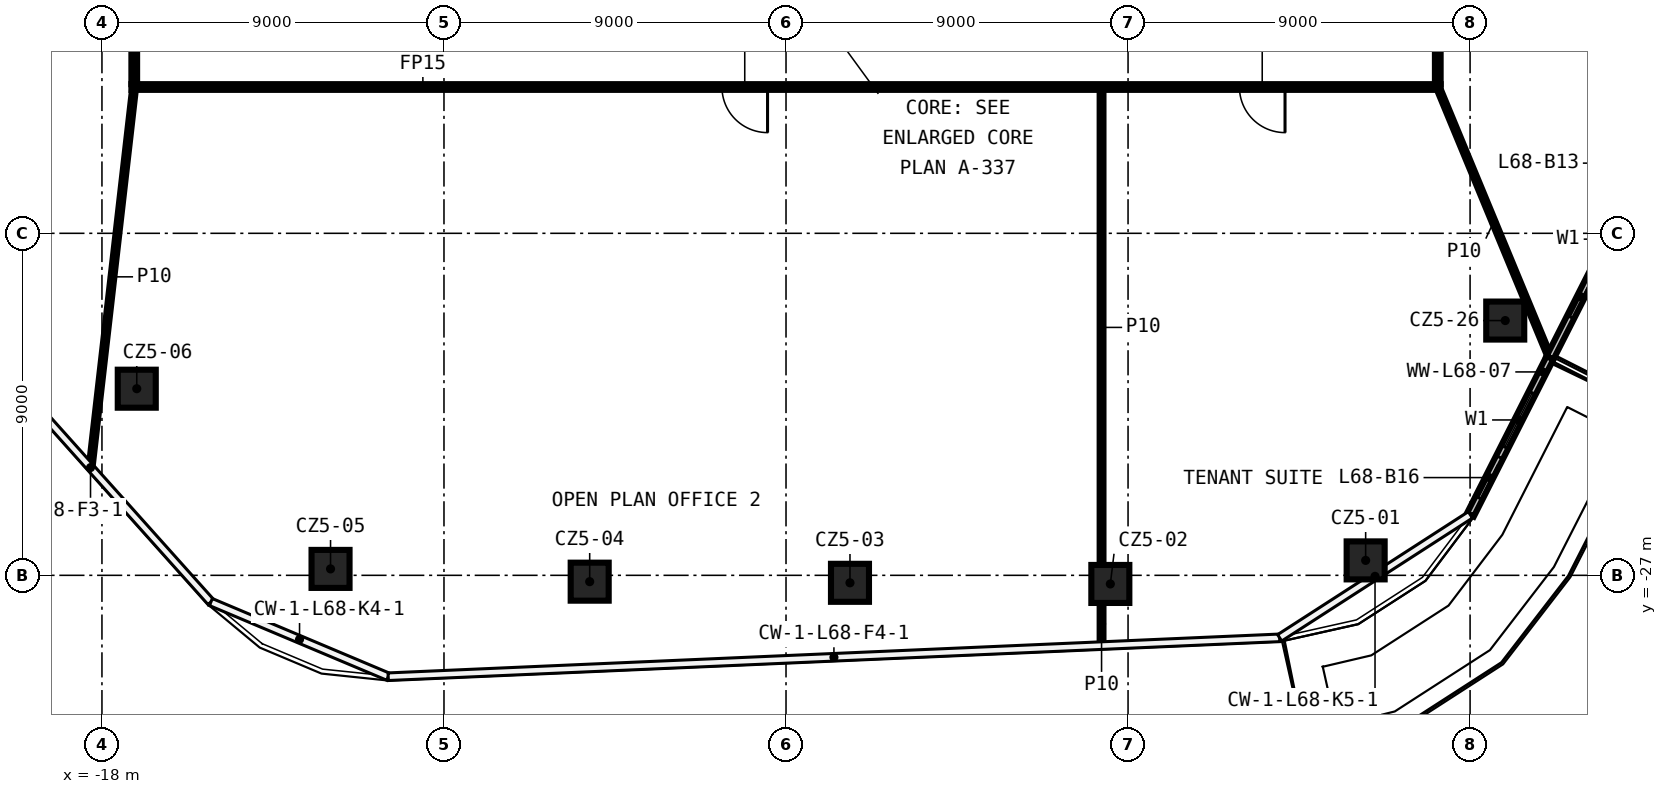
"""IFC4 building model, lengths in metres.
Left out: names, types, materials, properties, quantities, classifications, styles, units other than length and angle.
Written with IfcOpenShell. Run it as: python <this file> out.ifc"""

import sys

from ifc_helpers import new_model, si_unit, direction, frame, frame_2d, origin, origin_2d, place, context, subcontext, project, spatial, rectangle, extrude, element, fill, save


model = new_model("IFC4")
c1 = context("Model", 3, precision=1e-05, world=origin(), true_north=direction((0.0, 1.0)))
c2 = subcontext(c1, "Body", "Model", "MODEL_VIEW")
j1 = project(units=[si_unit("LENGTHUNIT", "METRE"), si_unit("PLANEANGLEUNIT", "RADIAN")], contexts=[c1])
p1 = place(None, origin())
s1 = spatial("IfcSite", under=j1, at=p1, CompositionType="ELEMENT")
p2 = place(p1, origin())
s2 = spatial("IfcBuilding", under=s1, at=p2, CompositionType="ELEMENT")
p3 = place(p2, frame((0.0, 0.0, 319.4)))
s3 = spatial("IfcBuildingStorey", under=s2, at=p3, CompositionType="ELEMENT", Elevation=319.4)
for number, where, z_axis, x_axis in (
    (1, (15.252, -26.607, 0.0), (0.0, 0.0, 1.0), (1.0, 0.0, 0.0)),
    (2, (8.534, -27.227, 0.0), (0.0, 0.0, 1.0), (1.0, 0.0, 0.0)),
    (3, (1.683, -27.197, 0.0), (0.0, 0.0, 1.0), (1.0, 0.0, 0.0)),
    (4, (-5.166, -27.167, 0.0), (0.0, 0.0, 1.0), (1.0, 0.0, 0.0)),
    (5, (-11.985, -26.831, 0.0), (0.0, 0.0, 1.0), (1.0, 0.0, 0.0)),
    (6, (-17.084, -22.089, 0.0), (0.0, 0.0, 1.0), (1.0, 0.0, 0.0)),
    (7, (18.925, -20.296, 0.0), (0.0, 0.0, 1.0), (1.0, 0.0, 0.0)),
):
    element("IfcColumn", number, at=place(p3, frame(where, z_axis=z_axis, x_axis=x_axis)), inside=s3, PredefinedType="COLUMN", context=c2, shape_type="SweptSolid", body=[
        extrude(rectangle(XDim=1.0, YDim=1.0, at=origin_2d()), origin(), (0.0, 0.0, 1.0), 3.82),
    ])
p4 = place(p3, frame((17.225, -14.15, 0.0), z_axis=(0.0, 0.0, 1.0), x_axis=(-1.0, 0.0, 0.0)))
e8 = element("IfcWall", 8, at=p4, inside=s3, PredefinedType="PARTITIONING", context=c2, shape_type="SweptSolid", body=[
    extrude(rectangle(XDim=34.45, YDim=0.15, at=frame_2d((17.225, 0.0))), origin(), (0.0, 0.0, 1.0), 3.82),
])
p5 = place(p4, frame((17.711, 0.0, 0.0)))
e9 = element("IfcOpeningElement", 9, at=p5, cuts=e8, PredefinedType="OPENING", context=c2, shape_type="SweptSolid", body=[
    extrude(rectangle(XDim=1.2, YDim=2.1, at=frame_2d((0.6, 1.05))), frame((0.0, 0.085, 0.0), z_axis=(0.0, -1.0, 0.0), x_axis=(1.0, 0.0, 0.0)), (0.0, 0.0, 1.0), 0.17),
])
p6 = place(p4, frame((4.094, 0.0, 0.0)))
e10 = element("IfcOpeningElement", 10, at=p6, cuts=e8, PredefinedType="OPENING", context=c2, shape_type="SweptSolid", body=[
    extrude(rectangle(XDim=1.2, YDim=2.1, at=frame_2d((0.6, 1.05))), frame((0.0, 0.085, 0.0), z_axis=(0.0, -1.0, 0.0), x_axis=(1.0, 0.0, 0.0)), (0.0, 0.0, 1.0), 0.17),
])
p7 = place(p3, frame((-18.296, -24.14, 0.0), z_axis=(0.0, 0.0, 1.0), x_axis=(0.11391359401, 0.993490660801, 0.0)))
e11 = element("IfcWall", 11, at=p7, inside=s3, PredefinedType="PARTITIONING", context=c2, shape_type="SweptSolid", body=[
    extrude(rectangle(XDim=10.056, YDim=0.1, at=frame_2d((5.028, 0.0))), origin(), (0.0, 0.0, 1.0), 3.82),
])
p8 = place(p3, frame((17.15, 14.075, 0.0), z_axis=(0.0, 0.0, 1.0), x_axis=(0.0, -1.0, 0.0)))
e12 = element("IfcWall", 12, at=p8, inside=s3, PredefinedType="PARTITIONING", context=c2, shape_type="SweptSolid", body=[
    extrude(rectangle(XDim=28.15, YDim=0.15, at=frame_2d((14.075, 0.0))), origin(), (0.0, 0.0, 1.0), 3.82),
])
p9 = place(p8, frame((18.186, 0.0, 0.0)))
e13 = element("IfcOpeningElement", 13, at=p9, cuts=e12, PredefinedType="OPENING", context=c2, shape_type="SweptSolid", body=[
    extrude(rectangle(XDim=1.2, YDim=2.1, at=frame_2d((0.6, 1.05))), frame((0.0, 0.085, 0.0), z_axis=(0.0, -1.0, 0.0), x_axis=(1.0, 0.0, 0.0)), (0.0, 0.0, 1.0), 0.17),
])
p10 = place(p3, frame((8.303, -28.83, 0.0), z_axis=(0.0, 0.0, 1.0), x_axis=(0.0, 1.0, 0.0)))
e14 = element("IfcWall", 14, at=p10, inside=s3, PredefinedType="PARTITIONING", context=c2, shape_type="SweptSolid", body=[
    extrude(rectangle(XDim=1.103, YDim=0.1, at=frame_2d((0.551, 0.0))), origin(), (0.0, 0.0, 1.0), 3.82),
])
p11 = place(p3, frame((8.303, -26.727, 0.0), z_axis=(0.0, 0.0, 1.0), x_axis=(0.0, 1.0, 0.0)))
e15 = element("IfcWall", 15, at=p11, inside=s3, PredefinedType="PARTITIONING", context=c2, shape_type="SweptSolid", body=[
    extrude(rectangle(XDim=12.502, YDim=0.1, at=frame_2d((6.251, 0.0))), origin(), (0.0, 0.0, 1.0), 3.82),
])
p12 = place(p3, frame((-17.15, -14.075, 0.0), z_axis=(0.0, 0.0, 1.0), x_axis=(0.0, 1.0, 0.0)))
e16 = element("IfcWall", 16, at=p12, inside=s3, PredefinedType="PARTITIONING", context=c2, shape_type="SweptSolid", body=[
    extrude(rectangle(XDim=28.15, YDim=0.15, at=frame_2d((14.075, 0.0))), origin(), (0.0, 0.0, 1.0), 3.82),
])
p13 = place(p12, frame((18.298, 0.0, 0.0)))
e17 = element("IfcOpeningElement", 17, at=p13, cuts=e16, PredefinedType="OPENING", context=c2, shape_type="SweptSolid", body=[
    extrude(rectangle(XDim=1.2, YDim=2.1, at=frame_2d((0.6, 1.05))), frame((0.0, 0.085, 0.0), z_axis=(0.0, -1.0, 0.0), x_axis=(1.0, 0.0, 0.0)), (0.0, 0.0, 1.0), 0.17),
])
p14 = place(p3, frame((17.15, -14.15, 0.0), z_axis=(0.0, 0.0, 1.0), x_axis=(0.382693080748, -0.923875535961, 0.0)))
e18 = element("IfcWall", 18, at=p14, inside=s3, PredefinedType="PARTITIONING", context=c2, shape_type="SweptSolid", body=[
    extrude(rectangle(XDim=7.687, YDim=0.1, at=frame_2d((3.843, 0.0))), origin(), (0.0, 0.0, 1.0), 3.82),
])
p15 = place(p3, frame((20.102, -21.276, 0.0), z_axis=(0.0, 0.0, 1.0), x_axis=(0.451966467013, 0.892034927957, 0.0)))
e19 = element("IfcWall", 19, at=p15, inside=s3, PredefinedType="SOLIDWALL", context=c2, shape_type="SweptSolid", body=[
    extrude(rectangle(XDim=18.57, YDim=0.2, at=frame_2d((9.285, 0.0))), origin(), (0.0, 0.0, 1.0), 3.82),
])
p16 = place(p15, frame((2.7, 0.0, 0.6)))
e20 = element("IfcOpeningElement", 20, at=p16, cuts=e19, PredefinedType="OPENING", context=c2, shape_type="SweptSolid", body=[
    extrude(rectangle(XDim=1.6, YDim=2.4, at=frame_2d((0.8, 1.2))), frame((0.0, 0.11, 0.0), z_axis=(0.0, -1.0, 0.0), x_axis=(1.0, 0.0, 0.0)), (0.0, 0.0, 1.0), 0.22),
])
p17 = place(p15, frame((1.2, 0.0, 0.0)))
e21 = element("IfcOpeningElement", 21, at=p17, cuts=e19, PredefinedType="OPENING", context=c2, shape_type="SweptSolid", body=[
    extrude(rectangle(XDim=1.2, YDim=2.4, at=frame_2d((0.6, 1.2))), frame((0.0, 0.11, 0.0), z_axis=(0.0, -1.0, 0.0), x_axis=(1.0, 0.0, 0.0)), (0.0, 0.0, 1.0), 0.22),
])
p18 = place(p15, frame((6.643, 0.0, 0.6)))
e22 = element("IfcOpeningElement", 22, at=p18, cuts=e19, PredefinedType="OPENING", context=c2, shape_type="SweptSolid", body=[
    extrude(rectangle(XDim=1.6, YDim=2.4, at=frame_2d((0.8, 1.2))), frame((0.0, 0.11, 0.0), z_axis=(0.0, -1.0, 0.0), x_axis=(1.0, 0.0, 0.0)), (0.0, 0.0, 1.0), 0.22),
])
p19 = place(p15, frame((5.143, 0.0, 0.0)))
e23 = element("IfcOpeningElement", 23, at=p19, cuts=e19, PredefinedType="OPENING", context=c2, shape_type="SweptSolid", body=[
    extrude(rectangle(XDim=1.2, YDim=2.4, at=frame_2d((0.6, 1.2))), frame((0.0, 0.11, 0.0), z_axis=(0.0, -1.0, 0.0), x_axis=(1.0, 0.0, 0.0)), (0.0, 0.0, 1.0), 0.22),
])
p20 = place(p15, frame((11.285, 0.0, 0.6)))
e24 = element("IfcOpeningElement", 24, at=p20, cuts=e19, PredefinedType="OPENING", context=c2, shape_type="SweptSolid", body=[
    extrude(rectangle(XDim=1.6, YDim=2.4, at=frame_2d((0.8, 1.2))), frame((0.0, 0.11, 0.0), z_axis=(0.0, -1.0, 0.0), x_axis=(1.0, 0.0, 0.0)), (0.0, 0.0, 1.0), 0.22),
])
p21 = place(p15, frame((9.785, 0.0, 0.0)))
e25 = element("IfcOpeningElement", 25, at=p21, cuts=e19, PredefinedType="OPENING", context=c2, shape_type="SweptSolid", body=[
    extrude(rectangle(XDim=1.2, YDim=2.4, at=frame_2d((0.6, 1.2))), frame((0.0, 0.11, 0.0), z_axis=(0.0, -1.0, 0.0), x_axis=(1.0, 0.0, 0.0)), (0.0, 0.0, 1.0), 0.22),
])
p22 = place(p15, frame((16.627, 0.0, 0.6)))
e26 = element("IfcOpeningElement", 26, at=p22, cuts=e19, PredefinedType="OPENING", context=c2, shape_type="SweptSolid", body=[
    extrude(rectangle(XDim=1.6, YDim=2.4, at=frame_2d((0.8, 1.2))), frame((0.0, 0.11, 0.0), z_axis=(0.0, -1.0, 0.0), x_axis=(1.0, 0.0, 0.0)), (0.0, 0.0, 1.0), 0.22),
])
p23 = place(p15, frame((15.127, 0.0, 0.0)))
e27 = element("IfcOpeningElement", 27, at=p23, cuts=e19, PredefinedType="OPENING", context=c2, shape_type="SweptSolid", body=[
    extrude(rectangle(XDim=1.2, YDim=2.4, at=frame_2d((0.6, 1.2))), frame((0.0, 0.11, 0.0), z_axis=(0.0, -1.0, 0.0), x_axis=(1.0, 0.0, 0.0)), (0.0, 0.0, 1.0), 0.22),
])
p24 = place(p3, frame((18.008, -25.409, 0.0), z_axis=(0.0, 0.0, 1.0), x_axis=(0.451970383378, 0.892032943646, 0.0)))
e28 = element("IfcWall", 28, at=p24, inside=s3, PredefinedType="SOLIDWALL", context=c2, shape_type="SweptSolid", body=[
    extrude(rectangle(XDim=4.634, YDim=0.2, at=frame_2d((2.317, 0.0))), origin(), (0.0, 0.0, 1.0), 3.82),
])
p25 = place(p24, frame((2.0, 0.0, 0.6)))
e29 = element("IfcOpeningElement", 29, at=p25, cuts=e28, PredefinedType="OPENING", context=c2, shape_type="SweptSolid", body=[
    extrude(rectangle(XDim=1.6, YDim=2.4, at=frame_2d((0.8, 1.2))), frame((0.0, 0.11, 0.0), z_axis=(0.0, -1.0, 0.0), x_axis=(1.0, 0.0, 0.0)), (0.0, 0.0, 1.0), 0.22),
])
p26 = place(p24, frame((0.5, 0.0, 0.0)))
e30 = element("IfcOpeningElement", 30, at=p26, cuts=e28, PredefinedType="OPENING", context=c2, shape_type="SweptSolid", body=[
    extrude(rectangle(XDim=1.2, YDim=2.4, at=frame_2d((0.6, 1.2))), frame((0.0, 0.11, 0.0), z_axis=(0.0, -1.0, 0.0), x_axis=(1.0, 0.0, 0.0)), (0.0, 0.0, 1.0), 0.22),
])
p27 = place(p5, origin())
e31 = element("IfcDoor", 31, at=p27, inside=s3, OperationType="SINGLE_SWING_LEFT", PredefinedType="DOOR", context=c2, shape_type="SweptSolid", body=[
    extrude(rectangle(XDim=1.2, YDim=2.1, at=frame_2d((0.6, 1.05))), frame((0.0, 0.025, 0.0), z_axis=(0.0, -1.0, 0.0), x_axis=(1.0, 0.0, 0.0)), (0.0, 0.0, 1.0), 0.05),
])
fill(e9, e31)
p28 = place(p6, origin())
e32 = element("IfcDoor", 32, at=p28, inside=s3, OperationType="SINGLE_SWING_RIGHT", PredefinedType="DOOR", context=c2, shape_type="SweptSolid", body=[
    extrude(rectangle(XDim=1.2, YDim=2.1, at=frame_2d((0.6, 1.05))), frame((0.0, 0.025, 0.0), z_axis=(0.0, -1.0, 0.0), x_axis=(1.0, 0.0, 0.0)), (0.0, 0.0, 1.0), 0.05),
])
fill(e10, e32)
p29 = place(p17, origin())
e33 = element("IfcDoor", 33, at=p29, inside=s3, OperationType="SLIDING_TO_LEFT", PredefinedType="DOOR", context=c2, shape_type="SweptSolid", body=[
    extrude(rectangle(XDim=1.2, YDim=2.4, at=frame_2d((0.6, 1.2))), frame((0.0, 0.025, 0.0), z_axis=(0.0, -1.0, 0.0), x_axis=(1.0, 0.0, 0.0)), (0.0, 0.0, 1.0), 0.05),
])
fill(e21, e33)
p30 = place(p25, origin())
e34 = element("IfcWindow", 34, at=p30, inside=s3, PartitioningType="SINGLE_PANEL", PredefinedType="WINDOW", context=c2, shape_type="SweptSolid", body=[
    extrude(rectangle(XDim=1.6, YDim=2.4, at=frame_2d((0.8, 1.2))), frame((0.0, 0.03, 0.0), z_axis=(0.0, -1.0, 0.0), x_axis=(1.0, 0.0, 0.0)), (0.0, 0.0, 1.0), 0.06),
])
fill(e29, e34)
p31 = place(p26, origin())
e35 = element("IfcDoor", 35, at=p31, inside=s3, OperationType="SLIDING_TO_LEFT", PredefinedType="DOOR", context=c2, shape_type="SweptSolid", body=[
    extrude(rectangle(XDim=1.2, YDim=2.4, at=frame_2d((0.6, 1.2))), frame((0.0, 0.025, 0.0), z_axis=(0.0, -1.0, 0.0), x_axis=(1.0, 0.0, 0.0)), (0.0, 0.0, 1.0), 0.05),
])
fill(e30, e35)
save(model, sys.argv[1])
